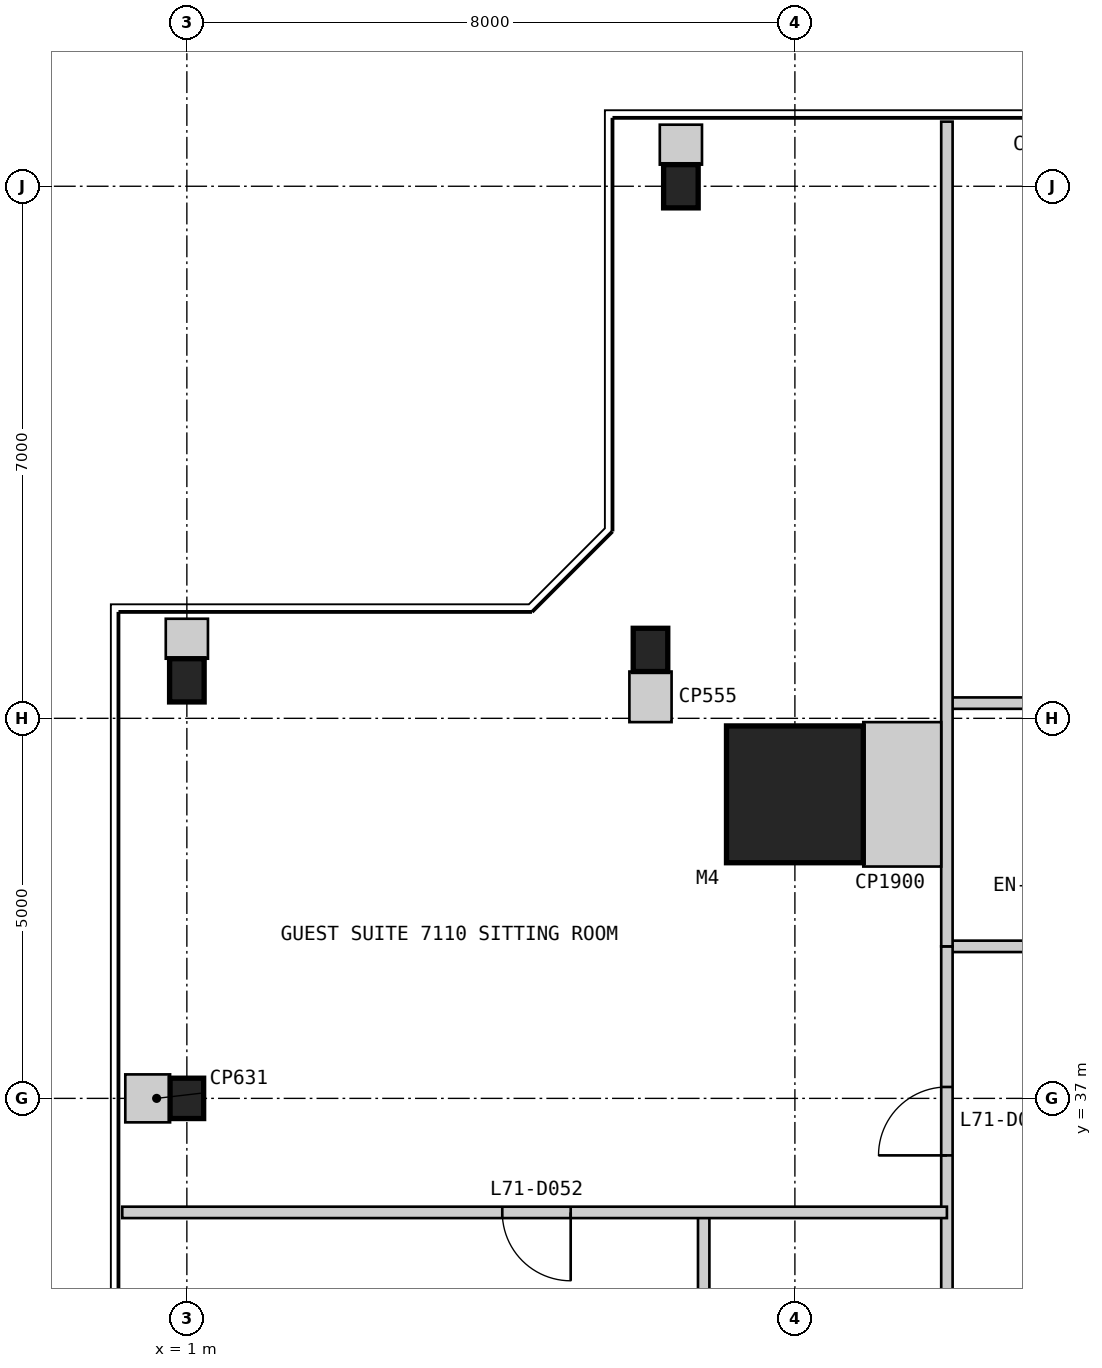
"""IFC4 building model, lengths in metres.
Left out: names, types, materials, properties, quantities, classifications, styles, units other than length and angle.
Written with IfcOpenShell. Run it as: python <this file> out.ifc"""

import sys

from ifc_helpers import new_model, si_unit, direction, frame, frame_2d, origin, origin_2d, place, context, subcontext, project, spatial, rectangle, i_section, extrude, element, fill, save


model = new_model("IFC4")
c1 = context("Model", 3, precision=1e-05, world=origin(), true_north=direction((0.0, 1.0)))
c2 = subcontext(c1, "Body", "Model", "MODEL_VIEW")
j1 = project(units=[si_unit("LENGTHUNIT", "METRE"), si_unit("PLANEANGLEUNIT", "RADIAN")], contexts=[c1])
p1 = place(None, origin())
s1 = spatial("IfcSite", under=j1, at=p1, CompositionType="ELEMENT")
p2 = place(p1, origin())
s2 = spatial("IfcBuilding", under=s1, at=p2, CompositionType="ELEMENT")
p3 = place(p2, frame((0.0, 0.0, 293.4)))
s3 = spatial("IfcBuildingStorey", under=s2, at=p3, CompositionType="ELEMENT", Elevation=293.4)
p4 = place(p3, frame((9.0, 41.0, 0.0), z_axis=(0.0, 0.0, 1.0), x_axis=(1.0, 0.0, 0.0)))
e1 = element("IfcColumn", 1, at=p4, inside=s3, PredefinedType="COLUMN", context=c2, shape_type="SweptSolid", body=[
    extrude(rectangle(XDim=1.8, YDim=1.8, at=origin_2d()), origin(), (0.0, 0.0, 1.0), 3.4),
])
for number, where, z_axis, x_axis in (
    (2, (7.5, 49.0, 0.0), (0.0, 0.0, 1.0), (1.0, 0.0, 0.0)),
    (3, (7.1, 42.9, 0.0), (0.0, 0.0, 1.0), (1.0, 0.0, 0.0)),
    (4, (1.0, 42.5, 0.0), (0.0, 0.0, 1.0), (1.0, 0.0, 0.0)),
):
    element("IfcColumn", number, at=place(p3, frame(where, z_axis=z_axis, x_axis=x_axis)), inside=s3, PredefinedType="COLUMN", context=c2, shape_type="SweptSolid", body=[
        extrude(i_section(OverallWidth=0.455, OverallDepth=0.569, WebThickness=0.078, FlangeThickness=0.125, at=origin_2d()), origin(), (0.0, 0.0, 1.0), 3.4),
    ])
p5 = place(p3, frame((1.0, 37.0, 0.0), z_axis=(0.0, 0.0, 1.0), x_axis=(1.0, 0.0, 0.0)))
e5 = element("IfcColumn", 5, at=p5, inside=s3, PredefinedType="COLUMN", context=c2, shape_type="SweptSolid", body=[
    extrude(i_section(OverallWidth=0.442, OverallDepth=0.531, WebThickness=0.066, FlangeThickness=0.106, at=origin_2d()), origin(), (0.0, 0.0, 1.0), 3.4),
])
p6 = place(p3, frame((39.0, 39.0, 0.0), z_axis=(0.0, 0.0, 1.0), x_axis=(-1.0, 0.0, 0.0)))
e6 = element("IfcWall", 6, at=p6, inside=s3, PredefinedType="PARTITIONING", context=c2, shape_type="SweptSolid", body=[
    extrude(rectangle(XDim=28.0, YDim=0.15, at=frame_2d((14.0, 0.0))), origin(), (0.0, 0.0, 1.0), 2.794),
])
p7 = place(p6, frame((2.275, 0.0, 0.0)))
e7 = element("IfcOpeningElement", 7, at=p7, cuts=e6, PredefinedType="OPENING", context=c2, shape_type="SweptSolid", body=[
    extrude(rectangle(XDim=0.9, YDim=2.1, at=frame_2d((0.45, 1.05))), frame((0.0, 0.085, 0.0), z_axis=(0.0, -1.0, 0.0), x_axis=(1.0, 0.0, 0.0)), (0.0, 0.0, 1.0), 0.17),
])
p8 = place(p6, frame((10.6, 0.0, 0.0)))
e8 = element("IfcOpeningElement", 8, at=p8, cuts=e6, PredefinedType="OPENING", context=c2, shape_type="SweptSolid", body=[
    extrude(rectangle(XDim=0.9, YDim=2.1, at=frame_2d((0.45, 1.05))), frame((0.0, 0.085, 0.0), z_axis=(0.0, -1.0, 0.0), x_axis=(1.0, 0.0, 0.0)), (0.0, 0.0, 1.0), 0.17),
])
p9 = place(p6, frame((17.0, 0.0, 0.0)))
e9 = element("IfcOpeningElement", 9, at=p9, cuts=e6, PredefinedType="OPENING", context=c2, shape_type="SweptSolid", body=[
    extrude(rectangle(XDim=0.9, YDim=2.1, at=frame_2d((0.45, 1.05))), frame((0.0, 0.085, 0.0), z_axis=(0.0, -1.0, 0.0), x_axis=(1.0, 0.0, 0.0)), (0.0, 0.0, 1.0), 0.17),
])
p10 = place(p6, frame((23.2, 0.0, 0.0)))
e10 = element("IfcOpeningElement", 10, at=p10, cuts=e6, PredefinedType="OPENING", context=c2, shape_type="SweptSolid", body=[
    extrude(rectangle(XDim=1.0, YDim=2.1, at=frame_2d((0.5, 1.05))), frame((0.0, 0.085, 0.0), z_axis=(0.0, -1.0, 0.0), x_axis=(1.0, 0.0, 0.0)), (0.0, 0.0, 1.0), 0.17),
])
p11 = place(p3, frame((14.2, 42.2, 0.0), z_axis=(0.0, 0.0, 1.0), x_axis=(-1.0, 0.0, 0.0)))
e11 = element("IfcWall", 11, at=p11, inside=s3, PredefinedType="PARTITIONING", context=c2, shape_type="SweptSolid", body=[
    extrude(rectangle(XDim=3.2, YDim=0.15, at=frame_2d((1.6, 0.0))), origin(), (0.0, 0.0, 1.0), 3.2),
])
p12 = place(p3, frame((11.0, 39.0, 0.0), z_axis=(0.0, 0.0, 1.0), x_axis=(0.0, -1.0, 0.0)))
e12 = element("IfcWall", 12, at=p12, inside=s3, PredefinedType="PARTITIONING", context=c2, shape_type="SweptSolid", body=[
    extrude(rectangle(XDim=28.0, YDim=0.15, at=frame_2d((14.0, 0.0))), origin(), (0.0, 0.0, 1.0), 2.794),
])
p13 = place(p12, frame((1.85, 0.0, 0.0)))
e13 = element("IfcOpeningElement", 13, at=p13, cuts=e12, PredefinedType="OPENING", context=c2, shape_type="SweptSolid", body=[
    extrude(rectangle(XDim=0.9, YDim=2.1, at=frame_2d((0.45, 1.05))), frame((0.0, 0.085, 0.0), z_axis=(0.0, -1.0, 0.0), x_axis=(1.0, 0.0, 0.0)), (0.0, 0.0, 1.0), 0.17),
])
p14 = place(p12, frame((11.0, 0.0, 0.0)))
e14 = element("IfcOpeningElement", 14, at=p14, cuts=e12, PredefinedType="OPENING", context=c2, shape_type="SweptSolid", body=[
    extrude(rectangle(XDim=0.9, YDim=2.1, at=frame_2d((0.45, 1.05))), frame((0.0, 0.085, 0.0), z_axis=(0.0, -1.0, 0.0), x_axis=(1.0, 0.0, 0.0)), (0.0, 0.0, 1.0), 0.17),
])
p15 = place(p12, frame((23.1, 0.0, 0.0)))
e15 = element("IfcOpeningElement", 15, at=p15, cuts=e12, PredefinedType="OPENING", context=c2, shape_type="SweptSolid", body=[
    extrude(rectangle(XDim=0.9, YDim=2.1, at=frame_2d((0.45, 1.05))), frame((0.0, 0.085, 0.0), z_axis=(0.0, -1.0, 0.0), x_axis=(1.0, 0.0, 0.0)), (0.0, 0.0, 1.0), 0.17),
])
p16 = place(p3, frame((11.0, 49.85, 0.0), z_axis=(0.0, 0.0, 1.0), x_axis=(0.0, -1.0, 0.0)))
e16 = element("IfcWall", 16, at=p16, inside=s3, PredefinedType="PARTITIONING", context=c2, shape_type="SweptSolid", body=[
    extrude(rectangle(XDim=10.85, YDim=0.15, at=frame_2d((5.425, 0.0))), origin(), (0.0, 0.0, 1.0), 2.794),
])
p17 = place(p3, frame((7.8, 35.5, 0.0), z_axis=(0.0, 0.0, 1.0), x_axis=(0.0, -1.0, 0.0)))
e17 = element("IfcWall", 17, at=p17, inside=s3, PredefinedType="PARTITIONING", context=c2, shape_type="SweptSolid", body=[
    extrude(rectangle(XDim=3.0, YDim=0.15, at=frame_2d((1.5, 0.0))), origin(), (0.0, 0.0, 1.0), 3.2),
])
p18 = place(p3, frame((0.15, 35.5, 0.0), z_axis=(0.0, 0.0, 1.0), x_axis=(1.0, 0.0, 0.0)))
e18 = element("IfcWall", 18, at=p18, inside=s3, PredefinedType="PARTITIONING", context=c2, shape_type="SweptSolid", body=[
    extrude(rectangle(XDim=10.85, YDim=0.15, at=frame_2d((5.425, 0.0))), origin(), (0.0, 0.0, 1.0), 3.2),
])
p19 = place(p18, frame((5.0, 0.0, 0.0)))
e19 = element("IfcOpeningElement", 19, at=p19, cuts=e18, PredefinedType="OPENING", context=c2, shape_type="SweptSolid", body=[
    extrude(rectangle(XDim=0.9, YDim=2.1, at=frame_2d((0.45, 1.05))), frame((0.0, 0.085, 0.0), z_axis=(0.0, -1.0, 0.0), x_axis=(1.0, 0.0, 0.0)), (0.0, 0.0, 1.0), 0.17),
])
p20 = place(p3, frame((10.925, 41.0, 0.0), z_axis=(0.0, 0.0, 1.0), x_axis=(-1.0, 0.0, 0.0)))
e20 = element("IfcWall", 20, at=p20, inside=s3, PredefinedType="PARTITIONING", context=c2, shape_type="SweptSolid", body=[
    extrude(rectangle(XDim=1.025, YDim=1.9, at=frame_2d((0.513, 0.0))), origin(), (0.0, 0.0, 1.0), 3.2),
])
p21 = place(p3, frame((7.5, 49.81, 0.0), z_axis=(0.0, 0.0, 1.0), x_axis=(0.0, -1.0, 0.0)))
e21 = element("IfcWall", 21, at=p21, inside=s3, PredefinedType="PARTITIONING", context=c2, shape_type="SweptSolid", body=[
    extrude(rectangle(XDim=0.526, YDim=0.555, at=frame_2d((0.263, 0.0))), origin(), (0.0, 0.0, 1.0), 3.2),
])
p22 = place(p3, frame((7.1, 41.95, 0.0), z_axis=(0.0, 0.0, 1.0), x_axis=(0.0, 1.0, 0.0)))
e22 = element("IfcWall", 22, at=p22, inside=s3, PredefinedType="PARTITIONING", context=c2, shape_type="SweptSolid", body=[
    extrude(rectangle(XDim=0.666, YDim=0.555, at=frame_2d((0.333, 0.0))), origin(), (0.0, 0.0, 1.0), 3.2),
])
p23 = place(p3, frame((1.0, 43.31, 0.0), z_axis=(0.0, 0.0, 1.0), x_axis=(0.0, -1.0, 0.0)))
e23 = element("IfcWall", 23, at=p23, inside=s3, PredefinedType="PARTITIONING", context=c2, shape_type="SweptSolid", body=[
    extrude(rectangle(XDim=0.526, YDim=0.555, at=frame_2d((0.263, 0.0))), origin(), (0.0, 0.0, 1.0), 3.2),
])
p24 = place(p3, frame((0.19, 37.0, 0.0), z_axis=(0.0, 0.0, 1.0), x_axis=(1.0, 0.0, 0.0)))
e24 = element("IfcWall", 24, at=p24, inside=s3, PredefinedType="PARTITIONING", context=c2, shape_type="SweptSolid", body=[
    extrude(rectangle(XDim=0.589, YDim=0.631, at=frame_2d((0.294, 0.0))), origin(), (0.0, 0.0, 1.0), 3.2),
])
p25 = place(p13, frame((0.9, 0.0, 0.0), z_axis=(0.0, 0.0, 1.0), x_axis=(-1.0, 0.0, 0.0)))
e25 = element("IfcDoor", 25, at=p25, inside=s3, OperationType="SINGLE_SWING_LEFT", PredefinedType="DOOR", context=c2, shape_type="SweptSolid", body=[
    extrude(rectangle(XDim=0.9, YDim=2.1, at=frame_2d((0.45, 1.05))), frame((0.0, 0.025, 0.0), z_axis=(0.0, -1.0, 0.0), x_axis=(1.0, 0.0, 0.0)), (0.0, 0.0, 1.0), 0.05),
])
fill(e13, e25)
p26 = place(p19, frame((0.9, 0.0, 0.0), z_axis=(0.0, 0.0, 1.0), x_axis=(-1.0, 0.0, 0.0)))
e26 = element("IfcDoor", 26, at=p26, inside=s3, OperationType="SINGLE_SWING_LEFT", PredefinedType="DOOR", context=c2, shape_type="SweptSolid", body=[
    extrude(rectangle(XDim=0.9, YDim=2.1, at=frame_2d((0.45, 1.05))), frame((0.0, 0.025, 0.0), z_axis=(0.0, -1.0, 0.0), x_axis=(1.0, 0.0, 0.0)), (0.0, 0.0, 1.0), 0.05),
])
fill(e19, e26)
save(model, sys.argv[1])
